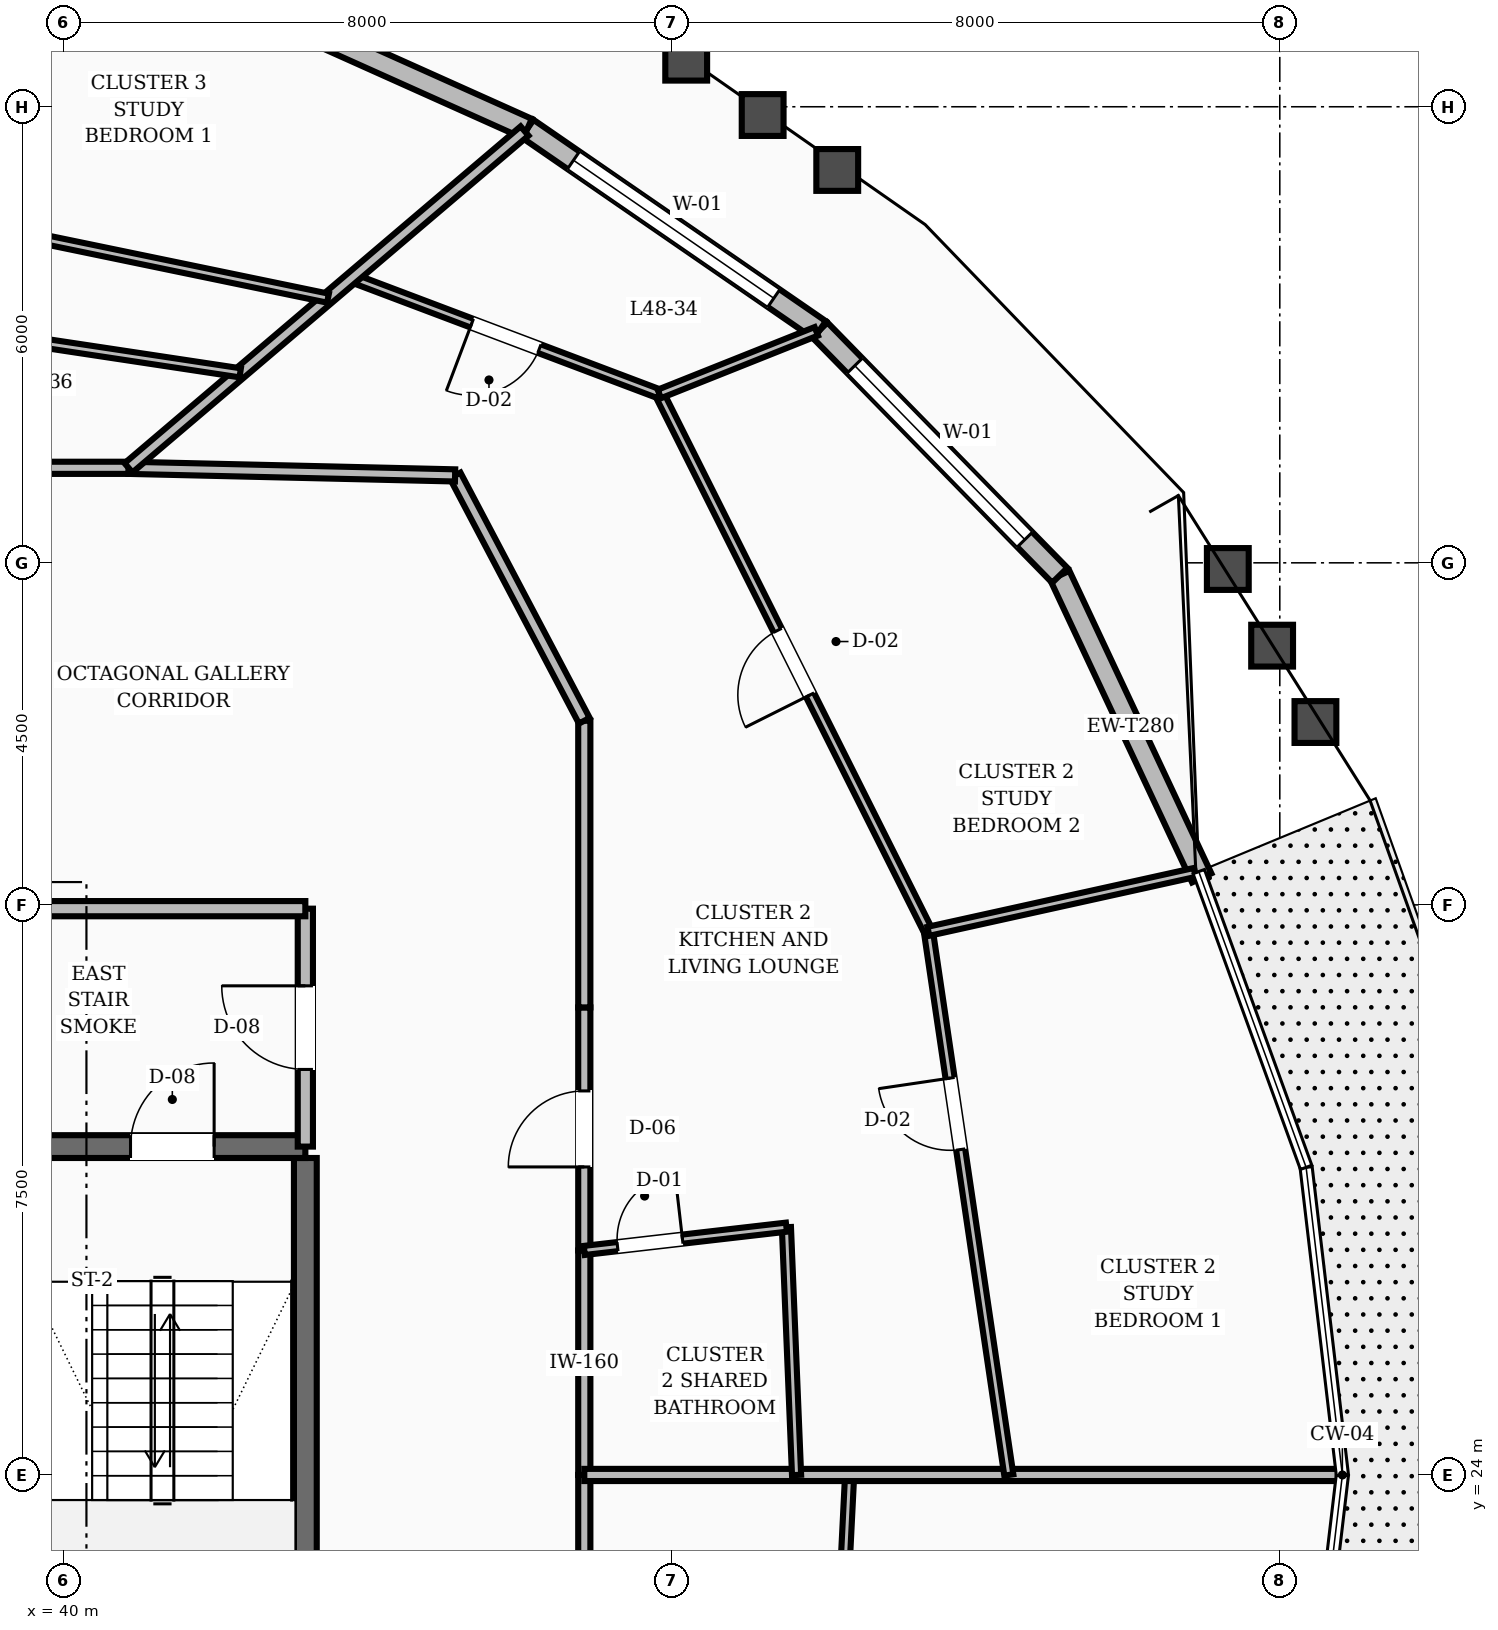
"""IFC4 building model, lengths in metres.
Left out: names, types, materials, properties, quantities, classifications, styles, units other than length and angle.
Written with IfcOpenShell. Run it as: python <this file> out.ifc"""

import sys

from ifc_helpers import new_model, si_unit, direction, frame, frame_2d, origin, place, context, subcontext, project, spatial, rectangle, extrude, element, fill, save


model = new_model("IFC4")
c1 = context("Model", 3, precision=1e-05, world=origin(), true_north=direction((0.0, 1.0)))
c2 = subcontext(c1, "Body", "Model", "MODEL_VIEW")
j1 = project(units=[si_unit("LENGTHUNIT", "METRE"), si_unit("PLANEANGLEUNIT", "RADIAN")], contexts=[c1])
p1 = place(None, origin())
s1 = spatial("IfcSite", under=j1, at=p1, CompositionType="ELEMENT")
p2 = place(p1, origin())
s2 = spatial("IfcBuilding", under=s1, at=p2, CompositionType="ELEMENT")
p3 = place(p2, frame((0.0, 0.0, 185.6)))
s3 = spatial("IfcBuildingStorey", under=s2, at=p3, CompositionType="ELEMENT", Elevation=185.6)
p4 = place(p3, frame((43.18, 19.43, 0.0), z_axis=(0.0, 0.0, 1.0), x_axis=(0.0, 1.0, 0.0)))
e1 = element("IfcWall", 1, at=p4, inside=s3, PredefinedType="SHEAR", context=c2, shape_type="SweptSolid", body=[
    extrude(rectangle(XDim=8.74, YDim=0.3, at=frame_2d((4.37, 0.0))), origin(), (0.0, 0.0, 1.0), 3.6),
])
p5 = place(p3, frame((39.58, 28.32, 0.0), z_axis=(0.0, 0.0, 1.0), x_axis=(1.0, 0.0, 0.0)))
e2 = element("IfcWall", 2, at=p5, inside=s3, PredefinedType="SHEAR", context=c2, shape_type="SweptSolid", body=[
    extrude(rectangle(XDim=3.6, YDim=0.3, at=frame_2d((1.8, 0.0))), origin(), (0.0, 0.0, 1.0), 3.6),
])
p6 = place(p5, frame((1.3, 0.0, 0.0)))
e3 = element("IfcOpeningElement", 3, at=p6, cuts=e2, PredefinedType="OPENING", context=c2, shape_type="SweptSolid", body=[
    extrude(rectangle(XDim=1.1, YDim=2.1, at=frame_2d((0.55, 1.05))), frame((0.0, 0.16, 0.0), z_axis=(0.0, -1.0, 0.0), x_axis=(1.0, 0.0, 0.0)), (0.0, 0.0, 1.0), 0.32),
])
p7 = place(p3, frame((54.973, 31.855, 0.0), z_axis=(0.0, 0.0, 1.0), x_axis=(-0.42470841279, 0.905330196175, 0.0)))
e4 = element("IfcWall", 4, at=p7, inside=s3, PredefinedType="STANDARD", context=c2, shape_type="SweptSolid", body=[
    extrude(rectangle(XDim=4.397, YDim=0.28, at=frame_2d((2.198, 0.0))), origin(), (0.0, 0.0, 1.0), 2.82),
])
p8 = place(p3, frame((53.105, 35.836, 0.0), z_axis=(0.0, 0.0, 1.0), x_axis=(-0.699140974596, 0.714983844322, 0.0)))
e5 = element("IfcWall", 5, at=p8, inside=s3, PredefinedType="STANDARD", context=c2, shape_type="SweptSolid", body=[
    extrude(rectangle(XDim=4.515, YDim=0.28, at=frame_2d((2.258, 0.0))), origin(), (0.0, 0.0, 1.0), 2.82),
])
p9 = place(p8, frame((0.658, 0.0, 0.8)))
e6 = element("IfcOpeningElement", 6, at=p9, cuts=e5, PredefinedType="OPENING", context=c2, shape_type="SweptSolid", body=[
    extrude(rectangle(XDim=3.2, YDim=1.65, at=frame_2d((1.6, 0.825))), frame((0.0, 0.15, 0.0), z_axis=(0.0, -1.0, 0.0), x_axis=(1.0, 0.0, 0.0)), (0.0, 0.0, 1.0), 0.3),
])
p10 = place(p3, frame((49.949, 39.064, 0.0), z_axis=(0.0, 0.0, 1.0), x_axis=(-0.823542873284, 0.567254031157, 0.0)))
e7 = element("IfcWall", 7, at=p10, inside=s3, PredefinedType="STANDARD", context=c2, shape_type="SweptSolid", body=[
    extrude(rectangle(XDim=4.671, YDim=0.28, at=frame_2d((2.335, 0.0))), origin(), (0.0, 0.0, 1.0), 2.82),
])
p11 = place(p10, frame((0.735, 0.0, 0.8)))
e8 = element("IfcOpeningElement", 8, at=p11, cuts=e7, PredefinedType="OPENING", context=c2, shape_type="SweptSolid", body=[
    extrude(rectangle(XDim=3.2, YDim=1.65, at=frame_2d((1.6, 0.825))), frame((0.0, 0.15, 0.0), z_axis=(0.0, -1.0, 0.0), x_axis=(1.0, 0.0, 0.0)), (0.0, 0.0, 1.0), 0.3),
])
p12 = place(p3, frame((46.102, 41.713, 0.0), z_axis=(0.0, 0.0, 1.0), x_axis=(-0.91240998906, 0.409277426525, 0.0)))
e9 = element("IfcWall", 9, at=p12, inside=s3, PredefinedType="STANDARD", context=c2, shape_type="SweptSolid", body=[
    extrude(rectangle(XDim=4.81, YDim=0.28, at=frame_2d((2.405, 0.0))), origin(), (0.0, 0.0, 1.0), 2.82),
])
p13 = place(p3, frame((43.18, 28.32, 0.0), z_axis=(0.0, 0.0, 1.0), x_axis=(0.0, 1.0, 0.0)))
e10 = element("IfcWall", 10, at=p13, inside=s3, PredefinedType="SOLIDWALL", context=c2, shape_type="SweptSolid", body=[
    extrude(rectangle(XDim=3.13, YDim=0.2, at=frame_2d((1.565, 0.0))), origin(), (0.0, 0.0, 1.0), 2.8),
])
p14 = place(p13, frame((1.015, 0.0, 0.0)))
e11 = element("IfcOpeningElement", 11, at=p14, cuts=e10, PredefinedType="OPENING", context=c2, shape_type="SweptSolid", body=[
    extrude(rectangle(XDim=1.1, YDim=2.1, at=frame_2d((0.55, 1.05))), frame((0.0, 0.11, 0.0), z_axis=(0.0, -1.0, 0.0), x_axis=(1.0, 0.0, 0.0)), (0.0, 0.0, 1.0), 0.22),
])
p15 = place(p3, frame((39.2, 31.45, 0.0), z_axis=(0.0, 0.0, 1.0), x_axis=(1.0, 0.0, 0.0)))
e12 = element("IfcWall", 12, at=p15, inside=s3, PredefinedType="SOLIDWALL", context=c2, shape_type="SweptSolid", body=[
    extrude(rectangle(XDim=3.98, YDim=0.2, at=frame_2d((1.99, 0.0))), origin(), (0.0, 0.0, 1.0), 2.8),
])
p16 = place(p3, frame((46.85, 24.0, 0.0), z_axis=(0.0, 0.0, 1.0), x_axis=(0.0, 1.0, 0.0)))
e13 = element("IfcWall", 13, at=p16, inside=s3, PredefinedType="SOLIDWALL", context=c2, shape_type="SweptSolid", body=[
    extrude(rectangle(XDim=2.954, YDim=0.16, at=frame_2d((1.477, 0.0))), origin(), (0.0, 0.0, 1.0), 2.8),
])
p17 = place(p3, frame((46.85, 26.954, 0.0), z_axis=(0.0, 0.0, 1.0), x_axis=(0.0, 1.0, 0.0)))
e14 = element("IfcWall", 14, at=p17, inside=s3, PredefinedType="SOLIDWALL", context=c2, shape_type="SweptSolid", body=[
    extrude(rectangle(XDim=3.197, YDim=0.16, at=frame_2d((1.599, 0.0))), origin(), (0.0, 0.0, 1.0), 2.8),
])
p18 = place(p17, frame((1.099, 0.0, 0.0)))
e15 = element("IfcOpeningElement", 15, at=p18, cuts=e14, PredefinedType="OPENING", context=c2, shape_type="SweptSolid", body=[
    extrude(rectangle(XDim=1.0, YDim=2.1, at=frame_2d((0.5, 1.05))), frame((0.0, 0.09, 0.0), z_axis=(0.0, -1.0, 0.0), x_axis=(1.0, 0.0, 0.0)), (0.0, 0.0, 1.0), 0.18),
])
p19 = place(p3, frame((46.85, 30.151, 0.0), z_axis=(0.0, 0.0, 1.0), x_axis=(0.0, 1.0, 0.0)))
e16 = element("IfcWall", 16, at=p19, inside=s3, PredefinedType="SOLIDWALL", context=c2, shape_type="SweptSolid", body=[
    extrude(rectangle(XDim=3.771, YDim=0.16, at=frame_2d((1.886, 0.0))), origin(), (0.0, 0.0, 1.0), 2.8),
])
p20 = place(p3, frame((46.85, 33.923, 0.0), z_axis=(0.0, 0.0, 1.0), x_axis=(-0.466093963429, 0.884735224378, 0.0)))
e17 = element("IfcWall", 17, at=p20, inside=s3, PredefinedType="SOLIDWALL", context=c2, shape_type="SweptSolid", body=[
    extrude(rectangle(XDim=3.648, YDim=0.16, at=frame_2d((1.824, 0.0))), origin(), (0.0, 0.0, 1.0), 2.8),
])
p21 = place(p3, frame((45.15, 37.15, 0.0), z_axis=(0.0, 0.0, 1.0), x_axis=(-0.999728709658, 0.023291781507, 0.0)))
e18 = element("IfcWall", 18, at=p21, inside=s3, PredefinedType="SOLIDWALL", context=c2, shape_type="SweptSolid", body=[
    extrude(rectangle(XDim=4.298, YDim=0.16, at=frame_2d((2.149, 0.0))), origin(), (0.0, 0.0, 1.0), 2.8),
])
p22 = place(p3, frame((40.854, 37.25, 0.0), z_axis=(0.0, 0.0, 1.0), x_axis=(-1.0, 0.0, 0.0)))
e19 = element("IfcWall", 19, at=p22, inside=s3, PredefinedType="SOLIDWALL", context=c2, shape_type="SweptSolid", body=[
    extrude(rectangle(XDim=3.365, YDim=0.16, at=frame_2d((1.683, 0.0))), origin(), (0.0, 0.0, 1.0), 2.8),
])
p23 = place(p3, frame((46.85, 21.046, 0.0), z_axis=(0.0, 0.0, 1.0), x_axis=(0.0, 1.0, 0.0)))
e20 = element("IfcWall", 20, at=p23, inside=s3, PredefinedType="SOLIDWALL", context=c2, shape_type="SweptSolid", body=[
    extrude(rectangle(XDim=2.954, YDim=0.16, at=frame_2d((1.477, 0.0))), origin(), (0.0, 0.0, 1.0), 2.8),
])
p24 = place(p3, frame((50.174, 20.664, 0.0), z_axis=(0.0, 0.0, 1.0), x_axis=(0.050061547069, 0.998746134663, 0.0)))
e21 = element("IfcWall", 21, at=p24, inside=s3, PredefinedType="PARTITIONING", context=c2, shape_type="SweptSolid", body=[
    extrude(rectangle(XDim=3.341, YDim=0.12, at=frame_2d((1.67, 0.0))), origin(), (0.0, 0.0, 1.0), 2.8),
])
p25 = place(p3, frame((46.85, 24.0, 0.0), z_axis=(0.0, 0.0, 1.0), x_axis=(1.0, 0.0, 0.0)))
e22 = element("IfcWall", 22, at=p25, inside=s3, PredefinedType="SOLIDWALL", context=c2, shape_type="SweptSolid", body=[
    extrude(rectangle(XDim=9.923, YDim=0.16, at=frame_2d((4.962, 0.0))), origin(), (0.0, 0.0, 1.0), 2.8),
])
p26 = place(p3, frame((49.643, 24.0, 0.0), z_axis=(0.0, 0.0, 1.0), x_axis=(-0.040930249188, 0.999162006234, 0.0)))
e23 = element("IfcWall", 23, at=p26, inside=s3, PredefinedType="PARTITIONING", context=c2, shape_type="SweptSolid", body=[
    extrude(rectangle(XDim=3.263, YDim=0.12, at=frame_2d((1.631, 0.0))), origin(), (0.0, 0.0, 1.0), 2.8),
])
p27 = place(p3, frame((46.85, 26.954, 0.0), z_axis=(0.0, 0.0, 1.0), x_axis=(0.993436471774, 0.114385211239, 0.0)))
e24 = element("IfcWall", 24, at=p27, inside=s3, PredefinedType="PARTITIONING", context=c2, shape_type="SweptSolid", body=[
    extrude(rectangle(XDim=2.677, YDim=0.12, at=frame_2d((1.338, 0.0))), origin(), (0.0, 0.0, 1.0), 2.8),
])
p28 = place(p27, frame((0.44, 0.0, 0.0)))
e25 = element("IfcOpeningElement", 25, at=p28, cuts=e24, PredefinedType="OPENING", context=c2, shape_type="SweptSolid", body=[
    extrude(rectangle(XDim=0.86, YDim=2.1, at=frame_2d((0.43, 1.05))), frame((0.0, 0.07, 0.0), z_axis=(0.0, -1.0, 0.0), x_axis=(1.0, 0.0, 0.0)), (0.0, 0.0, 1.0), 0.14),
])
p29 = place(p3, frame((52.435, 24.0, 0.0), z_axis=(0.0, 0.0, 1.0), x_axis=(-0.146355290516, 0.989232090532, 0.0)))
e26 = element("IfcWall", 26, at=p29, inside=s3, PredefinedType="PARTITIONING", context=c2, shape_type="SweptSolid", body=[
    extrude(rectangle(XDim=7.23, YDim=0.12, at=frame_2d((3.615, 0.0))), origin(), (0.0, 0.0, 1.0), 2.8),
])
p30 = place(p29, frame((4.328, 0.0, 0.0)))
e27 = element("IfcOpeningElement", 27, at=p30, cuts=e26, PredefinedType="OPENING", context=c2, shape_type="SweptSolid", body=[
    extrude(rectangle(XDim=0.95, YDim=2.1, at=frame_2d((0.475, 1.05))), frame((0.0, 0.07, 0.0), z_axis=(0.0, -1.0, 0.0), x_axis=(1.0, 0.0, 0.0)), (0.0, 0.0, 1.0), 0.14),
])
p31 = place(p3, frame((51.377, 31.152, 0.0), z_axis=(0.0, 0.0, 1.0), x_axis=(-0.447682893835, 0.894192387894, 0.0)))
e28 = element("IfcWall", 28, at=p31, inside=s3, PredefinedType="PARTITIONING", context=c2, shape_type="SweptSolid", body=[
    extrude(rectangle(XDim=7.906, YDim=0.12, at=frame_2d((3.953, 0.0))), origin(), (0.0, 0.0, 1.0), 2.8),
])
p32 = place(p31, frame((3.478, 0.0, 0.0)))
e29 = element("IfcOpeningElement", 29, at=p32, cuts=e28, PredefinedType="OPENING", context=c2, shape_type="SweptSolid", body=[
    extrude(rectangle(XDim=0.95, YDim=2.1, at=frame_2d((0.475, 1.05))), frame((0.0, 0.07, 0.0), z_axis=(0.0, -1.0, 0.0), x_axis=(1.0, 0.0, 0.0)), (0.0, 0.0, 1.0), 0.14),
])
p33 = place(p3, frame((51.377, 31.152, 0.0), z_axis=(0.0, 0.0, 1.0), x_axis=(0.976418342739, 0.215887053718, 0.0)))
e30 = element("IfcWall", 30, at=p33, inside=s3, PredefinedType="PARTITIONING", context=c2, shape_type="SweptSolid", body=[
    extrude(rectangle(XDim=3.593, YDim=0.12, at=frame_2d((1.796, 0.0))), origin(), (0.0, 0.0, 1.0), 2.8),
])
p34 = place(p3, frame((47.837, 38.222, 0.0), z_axis=(0.0, 0.0, 1.0), x_axis=(-0.935484123415, 0.353368723627, 0.0)))
e31 = element("IfcWall", 31, at=p34, inside=s3, PredefinedType="PARTITIONING", context=c2, shape_type="SweptSolid", body=[
    extrude(rectangle(XDim=4.324, YDim=0.12, at=frame_2d((2.162, 0.0))), origin(), (0.0, 0.0, 1.0), 2.8),
])
p35 = place(p34, frame((1.687, 0.0, 0.0)))
e32 = element("IfcOpeningElement", 32, at=p35, cuts=e31, PredefinedType="OPENING", context=c2, shape_type="SweptSolid", body=[
    extrude(rectangle(XDim=0.95, YDim=2.1, at=frame_2d((0.475, 1.05))), frame((0.0, 0.07, 0.0), z_axis=(0.0, -1.0, 0.0), x_axis=(1.0, 0.0, 0.0)), (0.0, 0.0, 1.0), 0.14),
])
p36 = place(p3, frame((47.837, 38.222, 0.0), z_axis=(0.0, 0.0, 1.0), x_axis=(0.928824664531, 0.370519557594, 0.0)))
e33 = element("IfcWall", 33, at=p36, inside=s3, PredefinedType="PARTITIONING", context=c2, shape_type="SweptSolid", body=[
    extrude(rectangle(XDim=2.223, YDim=0.12, at=frame_2d((1.112, 0.0))), origin(), (0.0, 0.0, 1.0), 2.8),
])
p37 = place(p3, frame((40.854, 37.25, 0.0), z_axis=(0.0, 0.0, 1.0), x_axis=(0.761808080293, 0.647802785421, 0.0)))
e34 = element("IfcWall", 34, at=p37, inside=s3, PredefinedType="SOLIDWALL", context=c2, shape_type="SweptSolid", body=[
    extrude(rectangle(XDim=6.84, YDim=0.16, at=frame_2d((3.42, 0.0))), origin(), (0.0, 0.0, 1.0), 2.8),
])
p38 = place(p3, frame((42.323, 38.5, 0.0), z_axis=(0.0, 0.0, 1.0), x_axis=(-0.988795772928, 0.149274644332, 0.0)))
e35 = element("IfcWall", 35, at=p38, inside=s3, PredefinedType="PARTITIONING", context=c2, shape_type="SweptSolid", body=[
    extrude(rectangle(XDim=3.693, YDim=0.12, at=frame_2d((1.846, 0.0))), origin(), (0.0, 0.0, 1.0), 2.8),
])
p39 = place(p3, frame((43.478, 39.482, 0.0), z_axis=(0.0, 0.0, 1.0), x_axis=(-0.979241044983, 0.202699225013, 0.0)))
e36 = element("IfcWall", 36, at=p39, inside=s3, PredefinedType="PARTITIONING", context=c2, shape_type="SweptSolid", body=[
    extrude(rectangle(XDim=7.847, YDim=0.12, at=frame_2d((3.923, 0.0))), origin(), (0.0, 0.0, 1.0), 2.8),
])
p40 = place(p39, frame((4.772, 0.0, 0.0)))
e37 = element("IfcOpeningElement", 37, at=p40, cuts=e36, PredefinedType="OPENING", context=c2, shape_type="SweptSolid", body=[
    extrude(rectangle(XDim=0.95, YDim=2.1, at=frame_2d((0.475, 1.05))), frame((0.0, 0.07, 0.0), z_axis=(0.0, -1.0, 0.0), x_axis=(1.0, 0.0, 0.0)), (0.0, 0.0, 1.0), 0.14),
])
p41 = place(p9, origin())
e38 = element("IfcWindow", 38, at=p41, inside=s3, PartitioningType="SINGLE_PANEL", PredefinedType="WINDOW", context=c2, shape_type="SweptSolid", body=[
    extrude(rectangle(XDim=3.2, YDim=1.65, at=frame_2d((1.6, 0.825))), frame((0.0, 0.03, 0.0), z_axis=(0.0, -1.0, 0.0), x_axis=(1.0, 0.0, 0.0)), (0.0, 0.0, 1.0), 0.06),
])
fill(e6, e38)
p42 = place(p11, origin())
e39 = element("IfcWindow", 39, at=p42, inside=s3, PartitioningType="SINGLE_PANEL", PredefinedType="WINDOW", context=c2, shape_type="SweptSolid", body=[
    extrude(rectangle(XDim=3.2, YDim=1.65, at=frame_2d((1.6, 0.825))), frame((0.0, 0.03, 0.0), z_axis=(0.0, -1.0, 0.0), x_axis=(1.0, 0.0, 0.0)), (0.0, 0.0, 1.0), 0.06),
])
fill(e8, e39)
p43 = place(p6, origin())
e40 = element("IfcDoor", 40, at=p43, inside=s3, OperationType="SINGLE_SWING_RIGHT", PredefinedType="DOOR", context=c2, shape_type="SweptSolid", body=[
    extrude(rectangle(XDim=1.1, YDim=2.1, at=frame_2d((0.55, 1.05))), frame((0.0, 0.025, 0.0), z_axis=(0.0, -1.0, 0.0), x_axis=(1.0, 0.0, 0.0)), (0.0, 0.0, 1.0), 0.05),
])
fill(e3, e40)
p44 = place(p14, origin())
e41 = element("IfcDoor", 41, at=p44, inside=s3, OperationType="SINGLE_SWING_RIGHT", PredefinedType="DOOR", context=c2, shape_type="SweptSolid", body=[
    extrude(rectangle(XDim=1.1, YDim=2.1, at=frame_2d((0.55, 1.05))), frame((0.0, 0.025, 0.0), z_axis=(0.0, -1.0, 0.0), x_axis=(1.0, 0.0, 0.0)), (0.0, 0.0, 1.0), 0.05),
])
fill(e11, e41)
p45 = place(p28, origin())
e42 = element("IfcDoor", 42, at=p45, inside=s3, OperationType="SINGLE_SWING_RIGHT", PredefinedType="DOOR", context=c2, shape_type="SweptSolid", body=[
    extrude(rectangle(XDim=0.86, YDim=2.1, at=frame_2d((0.43, 1.05))), frame((0.0, 0.025, 0.0), z_axis=(0.0, -1.0, 0.0), x_axis=(1.0, 0.0, 0.0)), (0.0, 0.0, 1.0), 0.05),
])
fill(e25, e42)
p46 = place(p18, origin())
e43 = element("IfcDoor", 43, at=p46, inside=s3, OperationType="SINGLE_SWING_LEFT", PredefinedType="DOOR", context=c2, shape_type="SweptSolid", body=[
    extrude(rectangle(XDim=1.0, YDim=2.1, at=frame_2d((0.5, 1.05))), frame((0.0, 0.025, 0.0), z_axis=(0.0, -1.0, 0.0), x_axis=(1.0, 0.0, 0.0)), (0.0, 0.0, 1.0), 0.05),
])
fill(e15, e43)
p47 = place(p30, origin())
e44 = element("IfcDoor", 44, at=p47, inside=s3, OperationType="SINGLE_SWING_RIGHT", PredefinedType="DOOR", context=c2, shape_type="SweptSolid", body=[
    extrude(rectangle(XDim=0.95, YDim=2.1, at=frame_2d((0.475, 1.05))), frame((0.0, 0.025, 0.0), z_axis=(0.0, -1.0, 0.0), x_axis=(1.0, 0.0, 0.0)), (0.0, 0.0, 1.0), 0.05),
])
fill(e27, e44)
p48 = place(p32, origin())
e45 = element("IfcDoor", 45, at=p48, inside=s3, OperationType="SINGLE_SWING_LEFT", PredefinedType="DOOR", context=c2, shape_type="SweptSolid", body=[
    extrude(rectangle(XDim=0.95, YDim=2.1, at=frame_2d((0.475, 1.05))), frame((0.0, 0.025, 0.0), z_axis=(0.0, -1.0, 0.0), x_axis=(1.0, 0.0, 0.0)), (0.0, 0.0, 1.0), 0.05),
])
fill(e29, e45)
p49 = place(p35, origin())
e46 = element("IfcDoor", 46, at=p49, inside=s3, OperationType="SINGLE_SWING_RIGHT", PredefinedType="DOOR", context=c2, shape_type="SweptSolid", body=[
    extrude(rectangle(XDim=0.95, YDim=2.1, at=frame_2d((0.475, 1.05))), frame((0.0, 0.025, 0.0), z_axis=(0.0, -1.0, 0.0), x_axis=(1.0, 0.0, 0.0)), (0.0, 0.0, 1.0), 0.05),
])
fill(e32, e46)
save(model, sys.argv[1])
